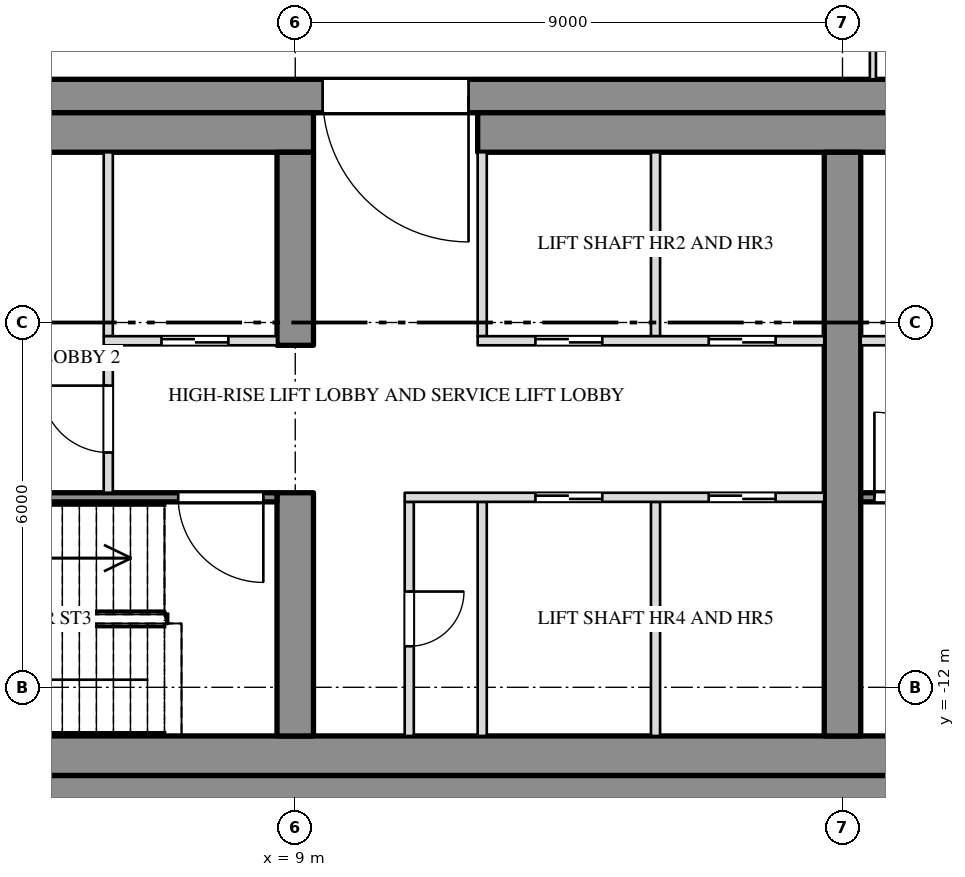
"""IFC4 building model, lengths in metres.
Left out: names, types, materials, properties, quantities, classifications, styles, units other than length and angle.
Written with IfcOpenShell. Run it as: python <this file> out.ifc"""

import sys

from ifc_helpers import new_model, si_unit, direction, frame, frame_2d, origin, place, context, subcontext, project, spatial, rectangle, extrude, element, fill, save


model = new_model("IFC4")
c1 = context("Model", 3, precision=1e-05, world=origin(), true_north=direction((0.0, 1.0)))
c2 = subcontext(c1, "Body", "Model", "MODEL_VIEW")
j1 = project(units=[si_unit("LENGTHUNIT", "METRE"), si_unit("PLANEANGLEUNIT", "RADIAN")], contexts=[c1])
p1 = place(None, origin())
s1 = spatial("IfcSite", under=j1, at=p1, CompositionType="ELEMENT")
p2 = place(p1, origin())
s2 = spatial("IfcBuilding", under=s1, at=p2, CompositionType="ELEMENT")
p3 = place(p2, frame((0.0, 0.0, 288.5)))
s3 = spatial("IfcBuildingStorey", under=s2, at=p3, CompositionType="ELEMENT", Elevation=288.5)
p4 = place(p3, frame((-27.0, -2.275, 0.0), z_axis=(0.0, 0.0, 1.0), x_axis=(1.0, 0.0, 0.0)))
e1 = element("IfcWall", 1, at=p4, inside=s3, PredefinedType="SHEAR", context=c2, shape_type="SweptSolid", body=[
    extrude(rectangle(XDim=54.0, YDim=0.55, at=frame_2d((27.0, 0.0))), origin(), (0.0, 0.0, 1.0), 3.78),
])
p5 = place(p4, frame((15.15, 0.0, 0.0)))
e2 = element("IfcOpeningElement", 2, at=p5, cuts=e1, PredefinedType="OPENING", context=c2, shape_type="SweptSolid", body=[
    extrude(rectangle(XDim=2.4, YDim=2.1, at=frame_2d((1.2, 1.05))), frame((0.0, 0.287, 0.0), z_axis=(0.0, -1.0, 0.0), x_axis=(1.0, 0.0, 0.0)), (0.0, 0.0, 1.0), 0.574),
])
p6 = place(p4, frame((36.45, 0.0, 0.0)))
e3 = element("IfcOpeningElement", 3, at=p6, cuts=e1, PredefinedType="OPENING", context=c2, shape_type="SweptSolid", body=[
    extrude(rectangle(XDim=2.4, YDim=2.1, at=frame_2d((1.2, 1.05))), frame((0.0, 0.287, 0.0), z_axis=(0.0, -1.0, 0.0), x_axis=(1.0, 0.0, 0.0)), (0.0, 0.0, 1.0), 0.574),
])
p7 = place(p3, frame((-27.0, -13.725, 0.0), z_axis=(0.0, 0.0, 1.0), x_axis=(1.0, 0.0, 0.0)))
e4 = element("IfcWall", 4, at=p7, inside=s3, PredefinedType="SHEAR", context=c2, shape_type="SweptSolid", body=[
    extrude(rectangle(XDim=54.0, YDim=0.55, at=frame_2d((27.0, 0.0))), origin(), (0.0, 0.0, 1.0), 3.78),
])
p8 = place(p3, frame((-9.3, -2.875, 0.0), z_axis=(0.0, 0.0, 1.0), x_axis=(1.0, 0.0, 0.0)))
e5 = element("IfcWall", 5, at=p8, inside=s3, PredefinedType="SHEAR", context=c2, shape_type="SweptSolid", body=[
    extrude(rectangle(XDim=18.6, YDim=0.65, at=frame_2d((9.3, 0.0))), origin(), (0.0, 0.0, 1.0), 3.78),
])
p9 = place(p3, frame((12.0, -2.875, 0.0), z_axis=(0.0, 0.0, 1.0), x_axis=(1.0, 0.0, 0.0)))
e6 = element("IfcWall", 6, at=p9, inside=s3, PredefinedType="SHEAR", context=c2, shape_type="SweptSolid", body=[
    extrude(rectangle(XDim=14.45, YDim=0.65, at=frame_2d((7.225, 0.0))), origin(), (0.0, 0.0, 1.0), 3.78),
])
p10 = place(p3, frame((-26.45, -13.125, 0.0), z_axis=(0.0, 0.0, 1.0), x_axis=(1.0, 0.0, 0.0)))
e7 = element("IfcWall", 7, at=p10, inside=s3, PredefinedType="SHEAR", context=c2, shape_type="SweptSolid", body=[
    extrude(rectangle(XDim=52.9, YDim=0.65, at=frame_2d((26.45, 0.0))), origin(), (0.0, 0.0, 1.0), 3.78),
])
p11 = place(p3, frame((9.0, -12.8, 0.0), z_axis=(0.0, 0.0, 1.0), x_axis=(0.0, 1.0, 0.0)))
e8 = element("IfcWall", 8, at=p11, inside=s3, PredefinedType="SHEAR", context=c2, shape_type="SweptSolid", body=[
    extrude(rectangle(XDim=4.0, YDim=0.6, at=frame_2d((2.0, 0.0))), origin(), (0.0, 0.0, 1.0), 3.78),
])
p12 = place(p3, frame((9.0, -6.375, 0.0), z_axis=(0.0, 0.0, 1.0), x_axis=(0.0, 1.0, 0.0)))
e9 = element("IfcWall", 9, at=p12, inside=s3, PredefinedType="SHEAR", context=c2, shape_type="SweptSolid", body=[
    extrude(rectangle(XDim=3.175, YDim=0.6, at=frame_2d((1.587, 0.0))), origin(), (0.0, 0.0, 1.0), 3.78),
])
p13 = place(p3, frame((18.0, -12.8, 0.0), z_axis=(0.0, 0.0, 1.0), x_axis=(0.0, 1.0, 0.0)))
e10 = element("IfcWall", 10, at=p13, inside=s3, PredefinedType="SHEAR", context=c2, shape_type="SweptSolid", body=[
    extrude(rectangle(XDim=9.6, YDim=0.6, at=frame_2d((4.8, 0.0))), origin(), (0.0, 0.0, 1.0), 3.78),
])
p14 = place(p3, frame((18.5, -2.0, 0.0), z_axis=(0.0, 0.0, 1.0), x_axis=(0.0, 1.0, 0.0)))
e11 = element("IfcWall", 11, at=p14, inside=s3, PredefinedType="PARTITIONING", context=c2, shape_type="SweptSolid", body=[
    extrude(rectangle(XDim=8.58, YDim=0.1, at=frame_2d((4.29, 0.0))), origin(), (0.0, 0.0, 1.0), 3.78),
])
p15 = place(p14, frame((3.8, 0.0, 0.0)))
e12 = element("IfcOpeningElement", 12, at=p15, cuts=e11, PredefinedType="OPENING", context=c2, shape_type="SweptSolid", body=[
    extrude(rectangle(XDim=1.0, YDim=2.1, at=frame_2d((0.5, 1.05))), frame((0.0, 0.062, 0.0), z_axis=(0.0, -1.0, 0.0), x_axis=(1.0, 0.0, 0.0)), (0.0, 0.0, 1.0), 0.124),
])
for number, where, z_axis, x_axis in (
    (13, (5.925, -6.225, 0.0), (0.0, 0.0, 1.0), (0.0, 1.0, 0.0)),
    (14, (12.075, -6.225, 0.0), (0.0, 0.0, 1.0), (0.0, 1.0, 0.0)),
    (15, (14.925, -6.225, 0.0), (0.0, 0.0, 1.0), (0.0, 1.0, 0.0)),
):
    element("IfcWall", number, at=place(p3, frame(where, z_axis=z_axis, x_axis=x_axis)), inside=s3, PredefinedType="PARTITIONING", context=c2, shape_type="SweptSolid", body=[
        extrude(rectangle(XDim=3.025, YDim=0.15, at=frame_2d((1.513, 0.0))), origin(), (0.0, 0.0, 1.0), 3.78),
    ])
p16 = place(p3, frame((10.875, -12.8, 0.0), z_axis=(0.0, 0.0, 1.0), x_axis=(0.0, 1.0, 0.0)))
e16 = element("IfcWall", 16, at=p16, inside=s3, PredefinedType="PARTITIONING", context=c2, shape_type="SweptSolid", body=[
    extrude(rectangle(XDim=3.85, YDim=0.15, at=frame_2d((1.925, 0.0))), origin(), (0.0, 0.0, 1.0), 3.78),
])
p17 = place(p16, frame((1.475, 0.0, 0.0)))
e17 = element("IfcOpeningElement", 17, at=p17, cuts=e16, PredefinedType="OPENING", context=c2, shape_type="SweptSolid", body=[
    extrude(rectangle(XDim=0.9, YDim=2.1, at=frame_2d((0.45, 1.05))), frame((0.0, 0.087, 0.0), z_axis=(0.0, -1.0, 0.0), x_axis=(1.0, 0.0, 0.0)), (0.0, 0.0, 1.0), 0.174),
])
for number, where, z_axis, x_axis in (
    (18, (12.075, -12.8, 0.0), (0.0, 0.0, 1.0), (0.0, 1.0, 0.0)),
    (19, (14.925, -12.8, 0.0), (0.0, 0.0, 1.0), (0.0, 1.0, 0.0)),
):
    element("IfcWall", number, at=place(p3, frame(where, z_axis=z_axis, x_axis=x_axis)), inside=s3, PredefinedType="PARTITIONING", context=c2, shape_type="SweptSolid", body=[
        extrude(rectangle(XDim=3.85, YDim=0.15, at=frame_2d((1.925, 0.0))), origin(), (0.0, 0.0, 1.0), 3.78),
    ])
p18 = place(p3, frame((5.925, -8.8, 0.0), z_axis=(0.0, 0.0, 1.0), x_axis=(0.0, 1.0, 0.0)))
e20 = element("IfcWall", 20, at=p18, inside=s3, PredefinedType="PARTITIONING", context=c2, shape_type="SweptSolid", body=[
    extrude(rectangle(XDim=2.425, YDim=0.15, at=frame_2d((1.212, 0.0))), origin(), (0.0, 0.0, 1.0), 3.78),
])
p19 = place(p18, frame((0.662, 0.0, 0.0)))
e21 = element("IfcOpeningElement", 21, at=p19, cuts=e20, PredefinedType="OPENING", context=c2, shape_type="SweptSolid", body=[
    extrude(rectangle(XDim=1.1, YDim=2.1, at=frame_2d((0.55, 1.05))), frame((0.0, 0.087, 0.0), z_axis=(0.0, -1.0, 0.0), x_axis=(1.0, 0.0, 0.0)), (0.0, 0.0, 1.0), 0.174),
])
p20 = place(p3, frame((5.85, -6.3, 0.0), z_axis=(0.0, 0.0, 1.0), x_axis=(1.0, 0.0, 0.0)))
e22 = element("IfcWall", 22, at=p20, inside=s3, PredefinedType="PARTITIONING", context=c2, shape_type="SweptSolid", body=[
    extrude(rectangle(XDim=2.85, YDim=0.15, at=frame_2d((1.425, 0.0))), origin(), (0.0, 0.0, 1.0), 3.78),
])
p21 = place(p20, frame((0.95, 0.0, 0.0)))
e23 = element("IfcOpeningElement", 23, at=p21, cuts=e22, PredefinedType="OPENING", context=c2, shape_type="SweptSolid", body=[
    extrude(rectangle(XDim=1.1, YDim=2.1, at=frame_2d((0.55, 1.05))), frame((0.0, 0.087, 0.0), z_axis=(0.0, -1.0, 0.0), x_axis=(1.0, 0.0, 0.0)), (0.0, 0.0, 1.0), 0.174),
])
p22 = place(p3, frame((12.0, -6.3, 0.0), z_axis=(0.0, 0.0, 1.0), x_axis=(1.0, 0.0, 0.0)))
e24 = element("IfcWall", 24, at=p22, inside=s3, PredefinedType="PARTITIONING", context=c2, shape_type="SweptSolid", body=[
    extrude(rectangle(XDim=5.7, YDim=0.15, at=frame_2d((2.85, 0.0))), origin(), (0.0, 0.0, 1.0), 3.78),
])
p23 = place(p22, frame((0.95, 0.0, 0.0)))
e25 = element("IfcOpeningElement", 25, at=p23, cuts=e24, PredefinedType="OPENING", context=c2, shape_type="SweptSolid", body=[
    extrude(rectangle(XDim=1.1, YDim=2.1, at=frame_2d((0.55, 1.05))), frame((0.0, 0.087, 0.0), z_axis=(0.0, -1.0, 0.0), x_axis=(1.0, 0.0, 0.0)), (0.0, 0.0, 1.0), 0.174),
])
p24 = place(p22, frame((3.8, 0.0, 0.0)))
e26 = element("IfcOpeningElement", 26, at=p24, cuts=e24, PredefinedType="OPENING", context=c2, shape_type="SweptSolid", body=[
    extrude(rectangle(XDim=1.1, YDim=2.1, at=frame_2d((0.55, 1.05))), frame((0.0, 0.087, 0.0), z_axis=(0.0, -1.0, 0.0), x_axis=(1.0, 0.0, 0.0)), (0.0, 0.0, 1.0), 0.174),
])
p25 = place(p3, frame((18.3, -6.3, 0.0), z_axis=(0.0, 0.0, 1.0), x_axis=(1.0, 0.0, 0.0)))
e27 = element("IfcWall", 27, at=p25, inside=s3, PredefinedType="PARTITIONING", context=c2, shape_type="SweptSolid", body=[
    extrude(rectangle(XDim=7.5, YDim=0.15, at=frame_2d((3.75, 0.0))), origin(), (0.0, 0.0, 1.0), 3.78),
])
p26 = place(p25, frame((0.7, 0.0, 0.0)))
e28 = element("IfcOpeningElement", 28, at=p26, cuts=e27, PredefinedType="OPENING", context=c2, shape_type="SweptSolid", body=[
    extrude(rectangle(XDim=1.0, YDim=2.1, at=frame_2d((0.5, 1.05))), frame((0.0, 0.087, 0.0), z_axis=(0.0, -1.0, 0.0), x_axis=(1.0, 0.0, 0.0)), (0.0, 0.0, 1.0), 0.174),
])
p27 = place(p25, frame((3.25, 0.0, 0.0)))
e29 = element("IfcOpeningElement", 29, at=p27, cuts=e27, PredefinedType="OPENING", context=c2, shape_type="SweptSolid", body=[
    extrude(rectangle(XDim=1.0, YDim=2.1, at=frame_2d((0.5, 1.05))), frame((0.0, 0.087, 0.0), z_axis=(0.0, -1.0, 0.0), x_axis=(1.0, 0.0, 0.0)), (0.0, 0.0, 1.0), 0.174),
])
p28 = place(p25, frame((5.75, 0.0, 0.0)))
e30 = element("IfcOpeningElement", 30, at=p28, cuts=e27, PredefinedType="OPENING", context=c2, shape_type="SweptSolid", body=[
    extrude(rectangle(XDim=1.1, YDim=2.1, at=frame_2d((0.55, 1.05))), frame((0.0, 0.087, 0.0), z_axis=(0.0, -1.0, 0.0), x_axis=(1.0, 0.0, 0.0)), (0.0, 0.0, 1.0), 0.174),
])
p29 = place(p3, frame((0.3, -8.875, 0.0), z_axis=(0.0, 0.0, 1.0), x_axis=(1.0, 0.0, 0.0)))
e31 = element("IfcWall", 31, at=p29, inside=s3, PredefinedType="SHEAR", context=c2, shape_type="SweptSolid", body=[
    extrude(rectangle(XDim=8.4, YDim=0.15, at=frame_2d((4.2, 0.0))), origin(), (0.0, 0.0, 1.0), 3.78),
])
p30 = place(p29, frame((6.775, 0.0, 0.0)))
e32 = element("IfcOpeningElement", 32, at=p30, cuts=e31, PredefinedType="OPENING", context=c2, shape_type="SweptSolid", body=[
    extrude(rectangle(XDim=1.4, YDim=2.1, at=frame_2d((0.7, 1.05))), frame((0.0, 0.087, 0.0), z_axis=(0.0, -1.0, 0.0), x_axis=(1.0, 0.0, 0.0)), (0.0, 0.0, 1.0), 0.174),
])
p31 = place(p3, frame((10.8, -8.875, 0.0), z_axis=(0.0, 0.0, 1.0), x_axis=(1.0, 0.0, 0.0)))
e33 = element("IfcWall", 33, at=p31, inside=s3, PredefinedType="PARTITIONING", context=c2, shape_type="SweptSolid", body=[
    extrude(rectangle(XDim=6.9, YDim=0.15, at=frame_2d((3.45, 0.0))), origin(), (0.0, 0.0, 1.0), 3.78),
])
p32 = place(p31, frame((2.15, 0.0, 0.0)))
e34 = element("IfcOpeningElement", 34, at=p32, cuts=e33, PredefinedType="OPENING", context=c2, shape_type="SweptSolid", body=[
    extrude(rectangle(XDim=1.1, YDim=2.1, at=frame_2d((0.55, 1.05))), frame((0.0, 0.087, 0.0), z_axis=(0.0, -1.0, 0.0), x_axis=(1.0, 0.0, 0.0)), (0.0, 0.0, 1.0), 0.174),
])
p33 = place(p31, frame((5.0, 0.0, 0.0)))
e35 = element("IfcOpeningElement", 35, at=p33, cuts=e33, PredefinedType="OPENING", context=c2, shape_type="SweptSolid", body=[
    extrude(rectangle(XDim=1.1, YDim=2.1, at=frame_2d((0.55, 1.05))), frame((0.0, 0.087, 0.0), z_axis=(0.0, -1.0, 0.0), x_axis=(1.0, 0.0, 0.0)), (0.0, 0.0, 1.0), 0.174),
])
p34 = place(p3, frame((18.3, -8.875, 0.0), z_axis=(0.0, 0.0, 1.0), x_axis=(1.0, 0.0, 0.0)))
e36 = element("IfcWall", 36, at=p34, inside=s3, PredefinedType="SHEAR", context=c2, shape_type="SweptSolid", body=[
    extrude(rectangle(XDim=7.5, YDim=0.15, at=frame_2d((3.75, 0.0))), origin(), (0.0, 0.0, 1.0), 3.78),
])
p35 = place(p34, frame((0.225, 0.0, 0.0)))
e37 = element("IfcOpeningElement", 37, at=p35, cuts=e36, PredefinedType="OPENING", context=c2, shape_type="SweptSolid", body=[
    extrude(rectangle(XDim=1.4, YDim=2.1, at=frame_2d((0.7, 1.05))), frame((0.0, 0.087, 0.0), z_axis=(0.0, -1.0, 0.0), x_axis=(1.0, 0.0, 0.0)), (0.0, 0.0, 1.0), 0.174),
])
p36 = place(p19, origin())
e38 = element("IfcDoor", 38, at=p36, inside=s3, OperationType="SINGLE_SWING_RIGHT", PredefinedType="DOOR", context=c2, shape_type="SweptSolid", body=[
    extrude(rectangle(XDim=1.1, YDim=2.1, at=frame_2d((0.55, 1.05))), frame((0.0, 0.025, 0.0), z_axis=(0.0, -1.0, 0.0), x_axis=(1.0, 0.0, 0.0)), (0.0, 0.0, 1.0), 0.05),
])
fill(e21, e38)
p37 = place(p21, origin())
e39 = element("IfcDoor", 39, at=p37, inside=s3, OperationType="SLIDING_TO_RIGHT", PredefinedType="DOOR", context=c2, shape_type="SweptSolid", body=[
    extrude(rectangle(XDim=1.1, YDim=2.1, at=frame_2d((0.55, 1.05))), frame((0.0, 0.025, 0.0), z_axis=(0.0, -1.0, 0.0), x_axis=(1.0, 0.0, 0.0)), (0.0, 0.0, 1.0), 0.05),
])
fill(e23, e39)
p38 = place(p30, origin())
e40 = element("IfcDoor", 40, at=p38, inside=s3, OperationType="DOUBLE_DOOR_SINGLE_SWING", PredefinedType="DOOR", context=c2, shape_type="SweptSolid", body=[
    extrude(rectangle(XDim=1.4, YDim=2.1, at=frame_2d((0.7, 1.05))), frame((0.0, 0.025, 0.0), z_axis=(0.0, -1.0, 0.0), x_axis=(1.0, 0.0, 0.0)), (0.0, 0.0, 1.0), 0.05),
])
fill(e32, e40)
p39 = place(p6, origin())
e41 = element("IfcDoor", 41, at=p39, inside=s3, OperationType="DOUBLE_DOOR_SINGLE_SWING", PredefinedType="DOOR", context=c2, shape_type="SweptSolid", body=[
    extrude(rectangle(XDim=2.4, YDim=2.1, at=frame_2d((1.2, 1.05))), frame((0.0, 0.025, 0.0), z_axis=(0.0, -1.0, 0.0), x_axis=(1.0, 0.0, 0.0)), (0.0, 0.0, 1.0), 0.05),
])
fill(e3, e41)
p40 = place(p17, origin())
e42 = element("IfcDoor", 42, at=p40, inside=s3, OperationType="SINGLE_SWING_LEFT", PredefinedType="DOOR", context=c2, shape_type="SweptSolid", body=[
    extrude(rectangle(XDim=0.9, YDim=2.1, at=frame_2d((0.45, 1.05))), frame((0.0, 0.025, 0.0), z_axis=(0.0, -1.0, 0.0), x_axis=(1.0, 0.0, 0.0)), (0.0, 0.0, 1.0), 0.05),
])
fill(e17, e42)
p41 = place(p32, origin())
e43 = element("IfcDoor", 43, at=p41, inside=s3, OperationType="SLIDING_TO_RIGHT", PredefinedType="DOOR", context=c2, shape_type="SweptSolid", body=[
    extrude(rectangle(XDim=1.1, YDim=2.1, at=frame_2d((0.55, 1.05))), frame((0.0, 0.025, 0.0), z_axis=(0.0, -1.0, 0.0), x_axis=(1.0, 0.0, 0.0)), (0.0, 0.0, 1.0), 0.05),
])
fill(e34, e43)
p42 = place(p23, origin())
e44 = element("IfcDoor", 44, at=p42, inside=s3, OperationType="SLIDING_TO_LEFT", PredefinedType="DOOR", context=c2, shape_type="SweptSolid", body=[
    extrude(rectangle(XDim=1.1, YDim=2.1, at=frame_2d((0.55, 1.05))), frame((0.0, 0.025, 0.0), z_axis=(0.0, -1.0, 0.0), x_axis=(1.0, 0.0, 0.0)), (0.0, 0.0, 1.0), 0.05),
])
fill(e25, e44)
p43 = place(p33, origin())
e45 = element("IfcDoor", 45, at=p43, inside=s3, OperationType="SLIDING_TO_RIGHT", PredefinedType="DOOR", context=c2, shape_type="SweptSolid", body=[
    extrude(rectangle(XDim=1.1, YDim=2.1, at=frame_2d((0.55, 1.05))), frame((0.0, 0.025, 0.0), z_axis=(0.0, -1.0, 0.0), x_axis=(1.0, 0.0, 0.0)), (0.0, 0.0, 1.0), 0.05),
])
fill(e35, e45)
p44 = place(p24, origin())
e46 = element("IfcDoor", 46, at=p44, inside=s3, OperationType="SLIDING_TO_LEFT", PredefinedType="DOOR", context=c2, shape_type="SweptSolid", body=[
    extrude(rectangle(XDim=1.1, YDim=2.1, at=frame_2d((0.55, 1.05))), frame((0.0, 0.025, 0.0), z_axis=(0.0, -1.0, 0.0), x_axis=(1.0, 0.0, 0.0)), (0.0, 0.0, 1.0), 0.05),
])
fill(e26, e46)
p45 = place(p35, origin())
e47 = element("IfcDoor", 47, at=p45, inside=s3, OperationType="DOUBLE_DOOR_SINGLE_SWING", PredefinedType="DOOR", context=c2, shape_type="SweptSolid", body=[
    extrude(rectangle(XDim=1.4, YDim=2.1, at=frame_2d((0.7, 1.05))), frame((0.0, 0.025, 0.0), z_axis=(0.0, -1.0, 0.0), x_axis=(1.0, 0.0, 0.0)), (0.0, 0.0, 1.0), 0.05),
])
fill(e37, e47)
save(model, sys.argv[1])
